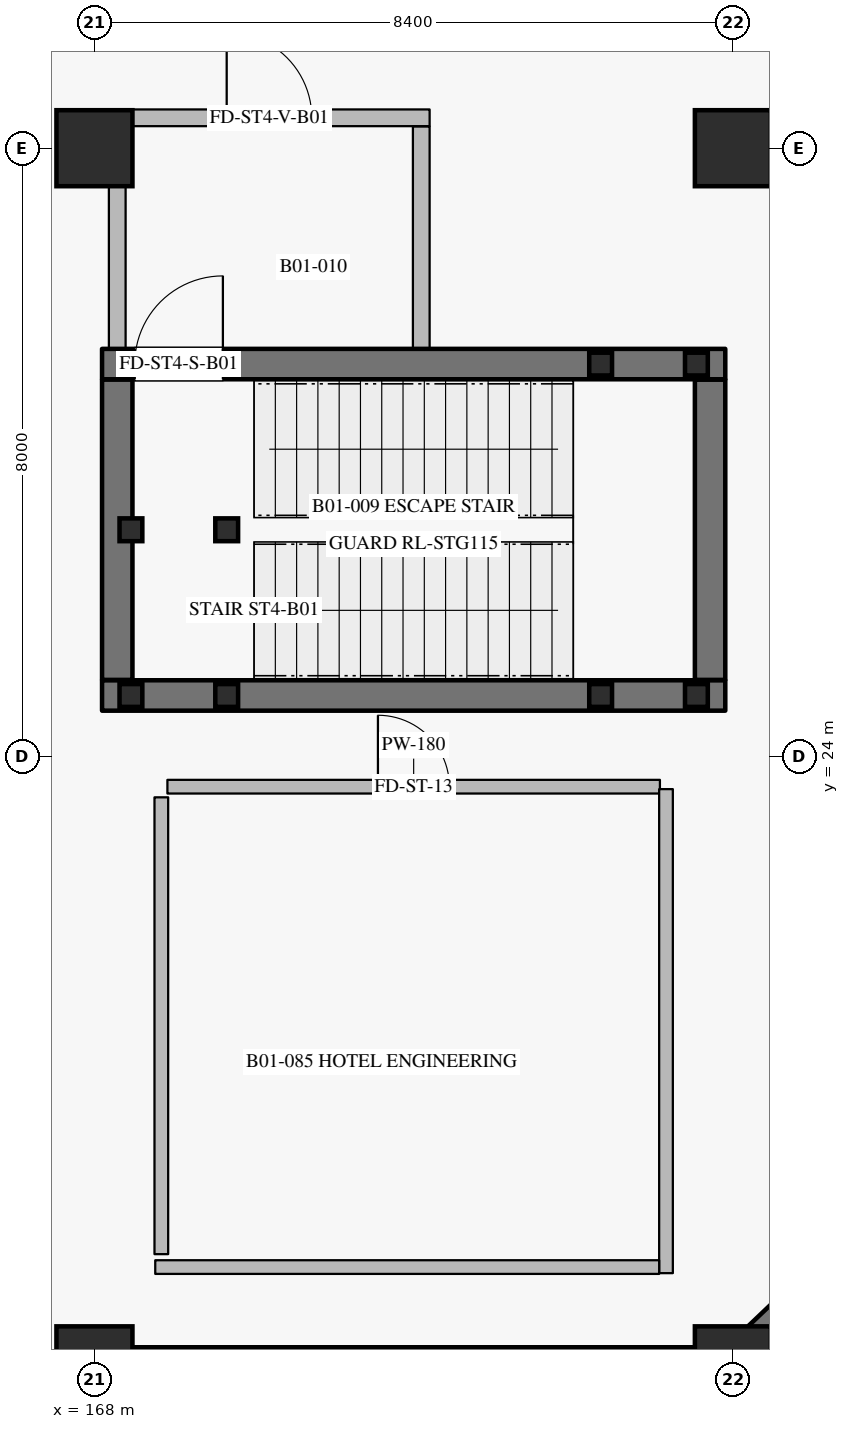
"""IFC4 building model, lengths in metres.
Left out: names, types, materials, properties, quantities, classifications, styles, units other than length and angle.
Written with IfcOpenShell. Run it as: python <this file> out.ifc"""

import sys

from ifc_helpers import new_model, si_unit, direction, frame, frame_2d, origin, origin_2d, place, context, subcontext, project, spatial, rectangle, hollow_rectangle, extrude, element, fill, save


model = new_model("IFC4")
c1 = context("Model", 3, precision=1e-05, world=origin(), true_north=direction((0.0, 1.0)))
c2 = subcontext(c1, "Body", "Model", "MODEL_VIEW")
j1 = project(units=[si_unit("LENGTHUNIT", "METRE"), si_unit("PLANEANGLEUNIT", "RADIAN")], contexts=[c1])
p1 = place(None, origin())
s1 = spatial("IfcSite", under=j1, at=p1, CompositionType="ELEMENT")
p2 = place(p1, origin())
s2 = spatial("IfcBuilding", under=s1, at=p2, CompositionType="ELEMENT")
p3 = place(p2, frame((0.0, 0.0, -5.4)))
s3 = spatial("IfcBuildingStorey", under=s2, at=p3, CompositionType="ELEMENT", Elevation=-5.4)
for number, where, z_axis, x_axis in (
    (1, (168.0, 16.0, 0.0), (0.0, 0.0, 1.0), (1.0, 0.0, 0.0)),
    (2, (168.0, 32.0, 0.0), (0.0, 0.0, 1.0), (1.0, 0.0, 0.0)),
    (3, (176.4, 16.0, 0.0), (0.0, 0.0, 1.0), (1.0, 0.0, 0.0)),
    (4, (176.4, 32.0, 0.0), (0.0, 0.0, 1.0), (1.0, 0.0, 0.0)),
):
    element("IfcColumn", number, at=place(p3, frame(where, z_axis=z_axis, x_axis=x_axis)), inside=s3, PredefinedType="COLUMN", context=c2, shape_type="SweptSolid", body=[
        extrude(rectangle(XDim=1.0, YDim=1.0, at=origin_2d()), origin(), (0.0, 0.0, 1.0), 5.4),
    ])
p4 = place(p3, frame((175.9, 16.0, 0.0), z_axis=(0.0, 0.0, 1.0), x_axis=(-1.0, 0.0, 0.0)))
e5 = element("IfcWall", 5, at=p4, inside=s3, PredefinedType="USERDEFINED", context=c2, shape_type="SweptSolid", body=[
    extrude(rectangle(XDim=7.4, YDim=0.45, at=frame_2d((3.7, 0.0))), origin(), (0.0, 0.0, 1.0), 4.3),
])
p5 = place(p3, frame((184.438, 23.655, 0.0), z_axis=(0.0, 0.0, 1.0), x_axis=(-0.72415874468, -0.689633317426, 0.0)))
e6 = element("IfcWall", 6, at=p5, inside=s3, PredefinedType="USERDEFINED", context=c2, shape_type="SweptSolid", body=[
    extrude(rectangle(XDim=10.6, YDim=0.45, at=frame_2d((5.3, 0.0))), origin(), (0.0, 0.0, 1.0), 4.3),
])
p6 = place(p3, frame((168.1, 24.8, 0.0), z_axis=(0.0, 0.0, 1.0), x_axis=(1.0, 0.0, 0.0)))
e7 = element("IfcWall", 7, at=p6, inside=s3, PredefinedType="SHEAR", context=c2, shape_type="SweptSolid", body=[
    extrude(rectangle(XDim=8.2, YDim=0.4, at=frame_2d((4.1, 0.0))), origin(), (0.0, 0.0, 1.0), 4.995),
])
p7 = place(p3, frame((176.1, 25.005, 0.0), z_axis=(0.0, 0.0, 1.0), x_axis=(0.0, 1.0, 0.0)))
e8 = element("IfcWall", 8, at=p7, inside=s3, PredefinedType="SHEAR", context=c2, shape_type="SweptSolid", body=[
    extrude(rectangle(XDim=3.95, YDim=0.4, at=frame_2d((1.975, 0.0))), origin(), (0.0, 0.0, 1.0), 4.995),
])
p8 = place(p3, frame((168.1, 29.16, 0.0), z_axis=(0.0, 0.0, 1.0), x_axis=(1.0, 0.0, 0.0)))
e9 = element("IfcWall", 9, at=p8, inside=s3, PredefinedType="SHEAR", context=c2, shape_type="SweptSolid", body=[
    extrude(rectangle(XDim=8.2, YDim=0.4, at=frame_2d((4.1, 0.0))), origin(), (0.0, 0.0, 1.0), 4.995),
])
p9 = place(p8, frame((0.43, 0.0, 0.0)))
e10 = element("IfcOpeningElement", 10, at=p9, cuts=e9, PredefinedType="OPENING", context=c2, shape_type="SweptSolid", body=[
    extrude(rectangle(XDim=1.16, YDim=2.2, at=frame_2d((0.58, 1.1))), frame((0.0, 0.21, 0.0), z_axis=(0.0, -1.0, 0.0), x_axis=(1.0, 0.0, 0.0)), (0.0, 0.0, 1.0), 0.42),
])
p10 = place(p3, frame((168.3, 25.005, 0.0), z_axis=(0.0, 0.0, 1.0), x_axis=(0.0, 1.0, 0.0)))
e11 = element("IfcWall", 11, at=p10, inside=s3, PredefinedType="SHEAR", context=c2, shape_type="SweptSolid", body=[
    extrude(rectangle(XDim=3.95, YDim=0.4, at=frame_2d((1.975, 0.0))), origin(), (0.0, 0.0, 1.0), 4.995),
])
p11 = place(p3, frame((168.3, 29.365, 0.0), z_axis=(0.0, 0.0, 1.0), x_axis=(0.0, 1.0, 0.0)))
e12 = element("IfcWall", 12, at=p11, inside=s3, PredefinedType="PARTITIONING", context=c2, shape_type="SweptSolid", body=[
    extrude(rectangle(XDim=2.92, YDim=0.22, at=frame_2d((1.46, 0.0))), origin(), (0.0, 0.0, 1.0), 4.1),
])
p12 = place(p3, frame((168.19, 32.4, 0.0), z_axis=(0.0, 0.0, 1.0), x_axis=(1.0, 0.0, 0.0)))
e13 = element("IfcWall", 13, at=p12, inside=s3, PredefinedType="PARTITIONING", context=c2, shape_type="SweptSolid", body=[
    extrude(rectangle(XDim=4.22, YDim=0.22, at=frame_2d((2.11, 0.0))), origin(), (0.0, 0.0, 1.0), 4.995),
])
p13 = place(p12, frame((1.55, 0.0, 0.0)))
e14 = element("IfcOpeningElement", 14, at=p13, cuts=e13, PredefinedType="OPENING", context=c2, shape_type="SweptSolid", body=[
    extrude(rectangle(XDim=1.12, YDim=2.2, at=frame_2d((0.56, 1.1))), frame((0.0, 0.12, 0.0), z_axis=(0.0, -1.0, 0.0), x_axis=(1.0, 0.0, 0.0)), (0.0, 0.0, 1.0), 0.24),
])
p14 = place(p3, frame((172.3, 29.365, 0.0), z_axis=(0.0, 0.0, 1.0), x_axis=(0.0, 1.0, 0.0)))
e15 = element("IfcWall", 15, at=p14, inside=s3, PredefinedType="PARTITIONING", context=c2, shape_type="SweptSolid", body=[
    extrude(rectangle(XDim=2.92, YDim=0.22, at=frame_2d((1.46, 0.0))), origin(), (0.0, 0.0, 1.0), 4.995),
])
for number, where, z_axis, x_axis in (
    (16, (168.48, 24.8, 0.0), (0.0, 0.0, 1.0), (1.0, 0.0, 0.0)),
    (17, (168.48, 26.98, 0.0), (0.0, 0.0, 1.0), (1.0, 0.0, 0.0)),
    (18, (169.74, 24.8, 0.0), (0.0, 0.0, 1.0), (1.0, 0.0, 0.0)),
    (19, (169.74, 26.98, 0.0), (0.0, 0.0, 1.0), (1.0, 0.0, 0.0)),
):
    element("IfcColumn", number, at=place(p3, frame(where, z_axis=z_axis, x_axis=x_axis)), inside=s3, PredefinedType="COLUMN", context=c2, shape_type="SweptSolid", body=[
        extrude(hollow_rectangle(XDim=0.3, YDim=0.3, WallThickness=0.012, at=origin_2d()), origin(), (0.0, 0.0, 1.0), 5.22),
    ])
for number, where, z_axis, x_axis in (
    (20, (174.66, 24.8, 0.0), (0.0, 0.0, 1.0), (1.0, 0.0, 0.0)),
    (21, (174.66, 29.16, 0.0), (0.0, 0.0, 1.0), (1.0, 0.0, 0.0)),
    (22, (175.92, 24.8, 0.0), (0.0, 0.0, 1.0), (1.0, 0.0, 0.0)),
    (23, (175.92, 29.16, 0.0), (0.0, 0.0, 1.0), (1.0, 0.0, 0.0)),
):
    element("IfcColumn", number, at=place(p3, frame(where, z_axis=z_axis, x_axis=x_axis)), inside=s3, PredefinedType="COLUMN", context=c2, shape_type="SweptSolid", body=[
        extrude(hollow_rectangle(XDim=0.3, YDim=0.3, WallThickness=0.012, at=origin_2d()), origin(), (0.0, 0.0, 1.0), 2.52),
    ])
p15 = place(p3, frame((168.96, 23.6, 0.0), z_axis=(0.0, 0.0, 1.0), x_axis=(1.0, 0.0, 0.0)))
e24 = element("IfcWall", 24, at=p15, inside=s3, PredefinedType="PARTITIONING", context=c2, shape_type="SweptSolid", body=[
    extrude(rectangle(XDim=6.48, YDim=0.18, at=frame_2d((3.24, 0.0))), origin(), (0.0, 0.0, 1.0), 4.995),
])
p16 = place(p15, frame((2.77, 0.0, 0.0)))
e25 = element("IfcOpeningElement", 25, at=p16, cuts=e24, PredefinedType="OPENING", context=c2, shape_type="SweptSolid", body=[
    extrude(rectangle(XDim=0.94, YDim=2.15, at=frame_2d((0.47, 1.075))), frame((0.0, 0.1, 0.0), z_axis=(0.0, -1.0, 0.0), x_axis=(1.0, 0.0, 0.0)), (0.0, 0.0, 1.0), 0.2),
])
p17 = place(p3, frame((168.88, 17.45, 0.0), z_axis=(0.0, 0.0, 1.0), x_axis=(0.0, 1.0, 0.0)))
e26 = element("IfcWall", 26, at=p17, inside=s3, PredefinedType="PARTITIONING", context=c2, shape_type="SweptSolid", body=[
    extrude(rectangle(XDim=6.01, YDim=0.18, at=frame_2d((3.005, 0.0))), origin(), (0.0, 0.0, 1.0), 4.995),
])
p18 = place(p3, frame((175.52, 17.2, 0.0), z_axis=(0.0, 0.0, 1.0), x_axis=(0.0, 1.0, 0.0)))
e27 = element("IfcWall", 27, at=p18, inside=s3, PredefinedType="PARTITIONING", context=c2, shape_type="SweptSolid", body=[
    extrude(rectangle(XDim=6.368, YDim=0.18, at=frame_2d((3.184, 0.0))), origin(), (0.0, 0.0, 1.0), 4.995),
])
p19 = place(p3, frame((168.8, 17.28, 0.0), z_axis=(0.0, 0.0, 1.0), x_axis=(1.0, 0.0, 0.0)))
e28 = element("IfcWall", 28, at=p19, inside=s3, PredefinedType="PARTITIONING", context=c2, shape_type="SweptSolid", body=[
    extrude(rectangle(XDim=6.63, YDim=0.18, at=frame_2d((3.315, 0.0))), origin(), (0.0, 0.0, 1.0), 4.995),
])
p20 = place(p9, origin())
e29 = element("IfcDoor", 29, at=p20, inside=s3, OperationType="SINGLE_SWING_RIGHT", PredefinedType="DOOR", context=c2, shape_type="SweptSolid", body=[
    extrude(rectangle(XDim=1.16, YDim=2.2, at=frame_2d((0.58, 1.1))), frame((0.0, 0.025, 0.0), z_axis=(0.0, -1.0, 0.0), x_axis=(1.0, 0.0, 0.0)), (0.0, 0.0, 1.0), 0.05),
])
fill(e10, e29)
p21 = place(p13, origin())
e30 = element("IfcDoor", 30, at=p21, inside=s3, OperationType="SINGLE_SWING_LEFT", PredefinedType="DOOR", context=c2, shape_type="SweptSolid", body=[
    extrude(rectangle(XDim=1.12, YDim=2.2, at=frame_2d((0.56, 1.1))), frame((0.0, 0.025, 0.0), z_axis=(0.0, -1.0, 0.0), x_axis=(1.0, 0.0, 0.0)), (0.0, 0.0, 1.0), 0.05),
])
fill(e14, e30)
p22 = place(p16, origin())
e31 = element("IfcDoor", 31, at=p22, inside=s3, OperationType="SINGLE_SWING_LEFT", PredefinedType="DOOR", context=c2, shape_type="SweptSolid", body=[
    extrude(rectangle(XDim=0.94, YDim=2.15, at=frame_2d((0.47, 1.075))), frame((0.0, 0.025, 0.0), z_axis=(0.0, -1.0, 0.0), x_axis=(1.0, 0.0, 0.0)), (0.0, 0.0, 1.0), 0.05),
])
fill(e25, e31)
save(model, sys.argv[1])
